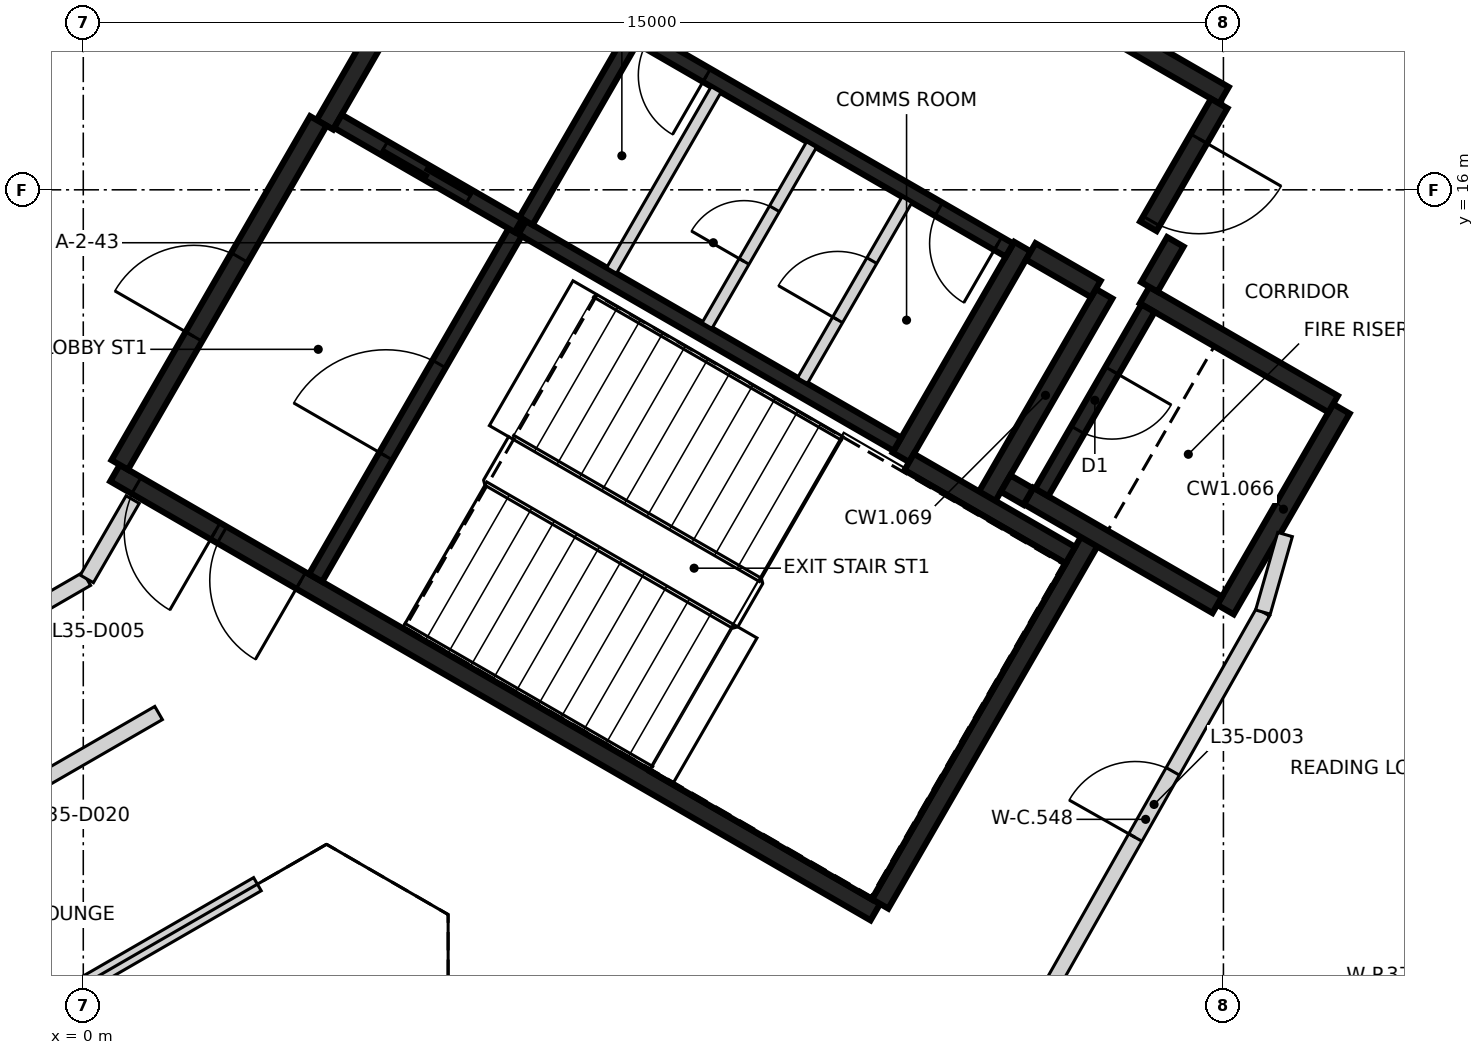
"""IFC4 building model, lengths in metres.
Left out: names, types, materials, properties, quantities, classifications, styles, units other than length and angle.
Written with IfcOpenShell. Run it as: python <this file> out.ifc"""

import sys

from ifc_helpers import new_model, si_unit, direction, frame, frame_2d, origin, place, context, subcontext, project, spatial, rectangle, extrude, element, fill, save


model = new_model("IFC4")
c1 = context("Model", 3, precision=1e-05, world=origin(), true_north=direction((0.0, 1.0)))
c2 = subcontext(c1, "Body", "Model", "MODEL_VIEW")
j1 = project(units=[si_unit("LENGTHUNIT", "METRE"), si_unit("PLANEANGLEUNIT", "RADIAN")], contexts=[c1])
p1 = place(None, origin())
s1 = spatial("IfcSite", under=j1, at=p1, CompositionType="ELEMENT")
p2 = place(p1, origin())
s2 = spatial("IfcBuilding", under=s1, at=p2, CompositionType="ELEMENT")
p3 = place(p2, frame((0.0, 0.0, 143.2)))
s3 = spatial("IfcBuildingStorey", under=s2, at=p3, CompositionType="ELEMENT", Elevation=143.2)
p4 = place(p3, frame((10.42, 6.498, 0.0), z_axis=(0.0, 0.0, 1.0), x_axis=(-0.866021906294, 0.500006057782, 0.0)))
e1 = element("IfcWall", 1, at=p4, inside=s3, PredefinedType="SHEAR", context=c2, shape_type="SweptSolid", body=[
    extrude(rectangle(XDim=11.55, YDim=0.25, at=frame_2d((5.775, 0.0))), origin(), (0.0, 0.0, 1.0), 3.2),
])
p5 = place(p4, frame((10.025, 0.0, 0.0)))
e2 = element("IfcOpeningElement", 2, at=p5, cuts=e1, PredefinedType="OPENING", context=c2, shape_type="SweptSolid", body=[
    extrude(rectangle(XDim=1.2, YDim=2.1, at=frame_2d((0.6, 1.05))), frame((0.0, 0.135, 0.0), z_axis=(0.0, -1.0, 0.0), x_axis=(1.0, 0.0, 0.0)), (0.0, 0.0, 1.0), 0.27),
])
p6 = place(p4, frame((8.725, 0.0, 0.0)))
e3 = element("IfcOpeningElement", 3, at=p6, cuts=e1, PredefinedType="OPENING", context=c2, shape_type="SweptSolid", body=[
    extrude(rectangle(XDim=1.2, YDim=2.1, at=frame_2d((0.6, 1.05))), frame((0.0, 0.135, 0.0), z_axis=(0.0, -1.0, 0.0), x_axis=(1.0, 0.0, 0.0)), (0.0, 0.0, 1.0), 0.27),
])
p7 = place(p3, frame((3.179, 16.856, 0.0), z_axis=(0.0, 0.0, 1.0), x_axis=(0.500004234368, 0.866022959057, 0.0)))
e4 = element("IfcWall", 4, at=p7, inside=s3, PredefinedType="SHEAR", context=c2, shape_type="SweptSolid", body=[
    extrude(rectangle(XDim=6.25, YDim=0.25, at=frame_2d((3.125, 0.0))), origin(), (0.0, 0.0, 1.0), 3.2),
])
p8 = place(p3, frame((0.48, 12.381, 0.0), z_axis=(0.0, 0.0, 1.0), x_axis=(0.49999885962, 0.866026062182, 0.0)))
e5 = element("IfcWall", 5, at=p8, inside=s3, PredefinedType="SHEAR", context=c2, shape_type="SweptSolid", body=[
    extrude(rectangle(XDim=5.225, YDim=0.25, at=frame_2d((2.612, 0.0))), origin(), (0.0, 0.0, 1.0), 3.2),
])
p9 = place(p8, frame((1.95, 0.0, 0.0)))
e6 = element("IfcOpeningElement", 6, at=p9, cuts=e5, PredefinedType="OPENING", context=c2, shape_type="SweptSolid", body=[
    extrude(rectangle(XDim=1.2, YDim=2.1, at=frame_2d((0.6, 1.05))), frame((0.0, 0.135, 0.0), z_axis=(0.0, -1.0, 0.0), x_axis=(1.0, 0.0, 0.0)), (0.0, 0.0, 1.0), 0.27),
])
p10 = place(p3, frame((13.238, 11.378, 0.0), z_axis=(0.0, 0.0, 1.0), x_axis=(-0.500008851346, -0.866020293397, 0.0)))
e7 = element("IfcWall", 7, at=p10, inside=s3, PredefinedType="SHEAR", context=c2, shape_type="SweptSolid", body=[
    extrude(rectangle(XDim=5.51, YDim=0.25, at=frame_2d((2.755, 0.0))), origin(), (0.0, 0.0, 1.0), 3.2),
])
p11 = place(p3, frame((12.357, 15.252, 0.0), z_axis=(0.0, 0.0, 1.0), x_axis=(-0.500028443584, -0.866008981251, 0.0)))
e8 = element("IfcWall", 8, at=p11, inside=s3, PredefinedType="SHEAR", context=c2, shape_type="SweptSolid", body=[
    extrude(rectangle(XDim=3.2, YDim=0.25, at=frame_2d((1.6, 0.0))), origin(), (0.0, 0.0, 1.0), 3.2),
])
p12 = place(p3, frame((16.552, 13.119, 0.0), z_axis=(0.0, 0.0, 1.0), x_axis=(-0.499978833458, -0.866037623948, 0.0)))
e9 = element("IfcWall", 9, at=p12, inside=s3, PredefinedType="SHEAR", context=c2, shape_type="SweptSolid", body=[
    extrude(rectangle(XDim=3.05, YDim=0.25, at=frame_2d((1.525, 0.0))), origin(), (0.0, 0.0, 1.0), 3.2),
])
p13 = place(p3, frame((14.918, 10.54, 0.0), z_axis=(0.0, 0.0, 1.0), x_axis=(-0.866063538972, 0.499933942099, 0.0)))
e10 = element("IfcWall", 10, at=p13, inside=s3, PredefinedType="SHEAR", context=c2, shape_type="SweptSolid", body=[
    extrude(rectangle(XDim=2.865, YDim=0.25, at=frame_2d((1.432, 0.0))), origin(), (0.0, 0.0, 1.0), 3.2),
])
p14 = place(p3, frame((13.963, 14.614, 0.0), z_axis=(0.0, 0.0, 1.0), x_axis=(0.866042235819, -0.499970844928, 0.0)))
e11 = element("IfcWall", 11, at=p14, inside=s3, PredefinedType="SHEAR", context=c2, shape_type="SweptSolid", body=[
    extrude(rectangle(XDim=2.865, YDim=0.25, at=frame_2d((1.432, 0.0))), origin(), (0.0, 0.0, 1.0), 3.2),
])
p15 = place(p3, frame((11.888, 11.961, 0.0), z_axis=(0.0, 0.0, 1.0), x_axis=(0.500003324108, 0.866023484601, 0.0)))
e12 = element("IfcWall", 12, at=p15, inside=s3, PredefinedType="SHEAR", context=c2, shape_type="SweptSolid", body=[
    extrude(rectangle(XDim=3.085, YDim=0.25, at=frame_2d((1.542, 0.0))), origin(), (0.0, 0.0, 1.0), 3.2),
])
p16 = place(p3, frame((10.865, 12.418, 0.0), z_axis=(0.0, 0.0, 1.0), x_axis=(0.866026229868, -0.499998569178, 0.0)))
e13 = element("IfcWall", 13, at=p16, inside=s3, PredefinedType="SHEAR", context=c2, shape_type="SweptSolid", body=[
    extrude(rectangle(XDim=2.449, YDim=0.25, at=frame_2d((1.225, 0.0))), origin(), (0.0, 0.0, 1.0), 3.2),
])
p17 = place(p3, frame((13.297, 18.231, 0.0), z_axis=(0.0, 0.0, 1.0), x_axis=(0.866043531843, -0.499968599967, 0.0)))
e14 = element("IfcWall", 14, at=p17, inside=s3, PredefinedType="SHEAR", context=c2, shape_type="SweptSolid", body=[
    extrude(rectangle(XDim=1.975, YDim=0.25, at=frame_2d((0.987, 0.0))), origin(), (0.0, 0.0, 1.0), 3.2),
])
p18 = place(p3, frame((14.945, 17.135, 0.0), z_axis=(0.0, 0.0, 1.0), x_axis=(-0.499983108224, -0.866035156036, 0.0)))
e15 = element("IfcWall", 15, at=p18, inside=s3, PredefinedType="SHEAR", context=c2, shape_type="SweptSolid", body=[
    extrude(rectangle(XDim=1.865, YDim=0.25, at=frame_2d((0.932, 0.0))), origin(), (0.0, 0.0, 1.0), 3.2),
])
p19 = place(p18, frame((0.535, 0.0, 0.0)))
e16 = element("IfcOpeningElement", 16, at=p19, cuts=e15, PredefinedType="OPENING", context=c2, shape_type="SweptSolid", body=[
    extrude(rectangle(XDim=1.25, YDim=2.1, at=frame_2d((0.625, 1.05))), frame((0.0, 0.135, 0.0), z_axis=(0.0, -1.0, 0.0), x_axis=(1.0, 0.0, 0.0)), (0.0, 0.0, 1.0), 0.27),
])
p20 = place(p3, frame((13.322, 14.695, 0.0), z_axis=(0.0, 0.0, 1.0), x_axis=(-0.866017078145, 0.500014420154, 0.0)))
e17 = element("IfcWall", 17, at=p20, inside=s3, PredefinedType="SHEAR", context=c2, shape_type="SweptSolid", body=[
    extrude(rectangle(XDim=0.989, YDim=0.25, at=frame_2d((0.495, 0.0))), origin(), (0.0, 0.0, 1.0), 3.2),
])
p21 = place(p3, frame((14.368, 15.315, 0.0), z_axis=(0.0, 0.0, 1.0), x_axis=(-0.499897359611, -0.866084655132, 0.0)))
e18 = element("IfcWall", 18, at=p21, inside=s3, PredefinedType="SHEAR", context=c2, shape_type="SweptSolid", body=[
    extrude(rectangle(XDim=0.685, YDim=0.25, at=frame_2d((0.342, 0.0))), origin(), (0.0, 0.0, 1.0), 3.2),
])
p22 = place(p3, frame((12.433, 11.964, 0.0), z_axis=(0.0, 0.0, 1.0), x_axis=(-0.866055875208, 0.499947218231, 0.0)))
e19 = element("IfcWall", 19, at=p22, inside=s3, PredefinedType="SHEAR", context=c2, shape_type="SweptSolid", body=[
    extrude(rectangle(XDim=0.345, YDim=0.25, at=frame_2d((0.172, 0.0))), origin(), (0.0, 0.0, 1.0), 3.2),
])
p23 = place(p3, frame((5.775, 15.502, 0.0), z_axis=(0.0, 0.0, 1.0), x_axis=(0.866020080793, -0.500009219579, 0.0)))
e20 = element("IfcWall", 20, at=p23, inside=s3, PredefinedType="SHEAR", context=c2, shape_type="SweptSolid", body=[
    extrude(rectangle(XDim=5.699, YDim=0.2, at=frame_2d((2.85, 0.0))), origin(), (0.0, 0.0, 1.0), 3.2),
])
p24 = place(p3, frame((12.185, 15.207, 0.0), z_axis=(0.0, 0.0, 1.0), x_axis=(-0.866020080793, 0.500009219579, 0.0)))
e21 = element("IfcWall", 21, at=p24, inside=s3, PredefinedType="SHEAR", context=c2, shape_type="SweptSolid", body=[
    extrude(rectangle(XDim=5.699, YDim=0.2, at=frame_2d((2.85, 0.0))), origin(), (0.0, 0.0, 1.0), 3.2),
])
p25 = place(p24, frame((0.174, 0.0, 0.0)))
e22 = element("IfcOpeningElement", 22, at=p25, cuts=e21, PredefinedType="OPENING", context=c2, shape_type="SweptSolid", body=[
    extrude(rectangle(XDim=0.9, YDim=2.1, at=frame_2d((0.45, 1.05))), frame((0.0, 0.11, 0.0), z_axis=(0.0, -1.0, 0.0), x_axis=(1.0, 0.0, 0.0)), (0.0, 0.0, 1.0), 0.22),
])
p26 = place(p24, frame((4.599, 0.0, 0.0)))
e23 = element("IfcOpeningElement", 23, at=p26, cuts=e21, PredefinedType="OPENING", context=c2, shape_type="SweptSolid", body=[
    extrude(rectangle(XDim=0.9, YDim=2.1, at=frame_2d((0.45, 1.05))), frame((0.0, 0.11, 0.0), z_axis=(0.0, -1.0, 0.0), x_axis=(1.0, 0.0, 0.0)), (0.0, 0.0, 1.0), 0.22),
])
p27 = place(p3, frame((3.057, 10.895, 0.0), z_axis=(0.0, 0.0, 1.0), x_axis=(0.499989418164, 0.866031513124, 0.0)))
e24 = element("IfcWall", 24, at=p27, inside=s3, PredefinedType="SHEAR", context=c2, shape_type="SweptSolid", body=[
    extrude(rectangle(XDim=5.251, YDim=0.2, at=frame_2d((2.625, 0.0))), origin(), (0.0, 0.0, 1.0), 3.2),
])
p28 = place(p27, frame((1.849, 0.0, 0.0)))
e25 = element("IfcOpeningElement", 25, at=p28, cuts=e24, PredefinedType="OPENING", context=c2, shape_type="SweptSolid", body=[
    extrude(rectangle(XDim=1.4, YDim=2.1, at=frame_2d((0.7, 1.05))), frame((0.0, 0.11, 0.0), z_axis=(0.0, -1.0, 0.0), x_axis=(1.0, 0.0, 0.0)), (0.0, 0.0, 1.0), 0.22),
])
p29 = place(p3, frame((14.008, 14.442, 0.0), z_axis=(0.0, 0.0, 1.0), x_axis=(-0.499986818241, -0.866033014143, 0.0)))
e26 = element("IfcWall", 26, at=p29, inside=s3, PredefinedType="SHEAR", context=c2, shape_type="SweptSolid", body=[
    extrude(rectangle(XDim=2.798, YDim=0.2, at=frame_2d((1.399, 0.0))), origin(), (0.0, 0.0, 1.0), 3.2),
])
p30 = place(p29, frame((0.949, 0.0, 0.0)))
e27 = element("IfcOpeningElement", 27, at=p30, cuts=e26, PredefinedType="OPENING", context=c2, shape_type="SweptSolid", body=[
    extrude(rectangle(XDim=0.9, YDim=2.1, at=frame_2d((0.45, 1.05))), frame((0.0, 0.11, 0.0), z_axis=(0.0, -1.0, 0.0), x_axis=(1.0, 0.0, 0.0)), (0.0, 0.0, 1.0), 0.22),
])
p31 = place(p3, frame((7.199, 17.97, 0.0), z_axis=(0.0, 0.0, 1.0), x_axis=(-0.499968400327, -0.866043647095, 0.0)))
e28 = element("IfcWall", 28, at=p31, inside=s3, PredefinedType="SHEAR", context=c2, shape_type="SweptSolid", body=[
    extrude(rectangle(XDim=2.75, YDim=0.2, at=frame_2d((1.375, 0.0))), origin(), (0.0, 0.0, 1.0), 3.2),
])
p32 = place(p3, frame((5.725, 15.531, 0.0), z_axis=(0.0, 0.0, 1.0), x_axis=(-0.866037306777, 0.499979382845, 0.0)))
e29 = element("IfcWall", 29, at=p32, inside=s3, PredefinedType="SHEAR", context=c2, shape_type="SweptSolid", body=[
    extrude(rectangle(XDim=2.742, YDim=0.2, at=frame_2d((1.371, 0.0))), origin(), (0.0, 0.0, 1.0), 3.2),
])
p33 = place(p32, frame((0.743, 0.0, 0.0)))
e30 = element("IfcOpeningElement", 30, at=p33, cuts=e29, PredefinedType="OPENING", context=c2, shape_type="SweptSolid", body=[
    extrude(rectangle(XDim=1.3, YDim=2.1, at=frame_2d((0.65, 1.05))), frame((0.0, 0.11, 0.0), z_axis=(0.0, -1.0, 0.0), x_axis=(1.0, 0.0, 0.0)), (0.0, 0.0, 1.0), 0.22),
])
p34 = place(p3, frame((9.462, 13.489, 0.0), z_axis=(0.0, 0.0, 1.0), x_axis=(0.50002746344, 0.86600954718, 0.0)))
e31 = element("IfcWall", 31, at=p34, inside=s3, PredefinedType="PARTITIONING", context=c2, shape_type="SweptSolid", body=[
    extrude(rectangle(XDim=2.748, YDim=0.15, at=frame_2d((1.374, 0.0))), origin(), (0.0, 0.0, 1.0), 3.2),
])
p35 = place(p34, frame((0.924, 0.0, 0.0)))
e32 = element("IfcOpeningElement", 32, at=p35, cuts=e31, PredefinedType="OPENING", context=c2, shape_type="SweptSolid", body=[
    extrude(rectangle(XDim=0.9, YDim=2.1, at=frame_2d((0.45, 1.05))), frame((0.0, 0.085, 0.0), z_axis=(0.0, -1.0, 0.0), x_axis=(1.0, 0.0, 0.0)), (0.0, 0.0, 1.0), 0.17),
])
p36 = place(p3, frame((8.207, 14.214, 0.0), z_axis=(0.0, 0.0, 1.0), x_axis=(0.499922376475, 0.866070215109, 0.0)))
e33 = element("IfcWall", 33, at=p36, inside=s3, PredefinedType="PARTITIONING", context=c2, shape_type="SweptSolid", body=[
    extrude(rectangle(XDim=2.749, YDim=0.15, at=frame_2d((1.374, 0.0))), origin(), (0.0, 0.0, 1.0), 3.2),
])
p37 = place(p36, frame((0.974, 0.0, 0.0)))
e34 = element("IfcOpeningElement", 34, at=p37, cuts=e33, PredefinedType="OPENING", context=c2, shape_type="SweptSolid", body=[
    extrude(rectangle(XDim=0.8, YDim=2.1, at=frame_2d((0.4, 1.05))), frame((0.0, 0.085, 0.0), z_axis=(0.0, -1.0, 0.0), x_axis=(1.0, 0.0, 0.0)), (0.0, 0.0, 1.0), 0.17),
])
p38 = place(p3, frame((6.951, 14.939, 0.0), z_axis=(0.0, 0.0, 1.0), x_axis=(0.50002746344, 0.86600954718, 0.0)))
e35 = element("IfcWall", 35, at=p38, inside=s3, PredefinedType="PARTITIONING", context=c2, shape_type="SweptSolid", body=[
    extrude(rectangle(XDim=2.748, YDim=0.15, at=frame_2d((1.374, 0.0))), origin(), (0.0, 0.0, 1.0), 3.2),
])
p39 = place(p3, frame((-8.382, 3.705, 0.0), z_axis=(0.0, 0.0, 1.0), x_axis=(0.866012036978, 0.500023151273, 0.0)))
e36 = element("IfcWall", 36, at=p39, inside=s3, PredefinedType="PARTITIONING", context=c2, shape_type="SweptSolid", body=[
    extrude(rectangle(XDim=10.823, YDim=0.2, at=frame_2d((5.412, 0.0))), origin(), (0.0, 0.0, 1.0), 3.2),
])
p40 = place(p39, frame((7.661, 0.0, 0.0)))
e37 = element("IfcOpeningElement", 37, at=p40, cuts=e36, PredefinedType="OPENING", context=c2, shape_type="SweptSolid", body=[
    extrude(rectangle(XDim=0.9, YDim=2.1, at=frame_2d((0.45, 1.05))), frame((0.0, 0.11, 0.0), z_axis=(0.0, -1.0, 0.0), x_axis=(1.0, 0.0, 0.0)), (0.0, 0.0, 1.0), 0.22),
])
p41 = place(p39, frame((2.261, 0.0, 0.0)))
e38 = element("IfcOpeningElement", 38, at=p41, cuts=e36, PredefinedType="OPENING", context=c2, shape_type="SweptSolid", body=[
    extrude(rectangle(XDim=0.9, YDim=2.1, at=frame_2d((0.45, 1.05))), frame((0.0, 0.11, 0.0), z_axis=(0.0, -1.0, 0.0), x_axis=(1.0, 0.0, 0.0)), (0.0, 0.0, 1.0), 0.22),
])
p42 = place(p3, frame((-8.161, 6.142, 0.0), z_axis=(0.0, 0.0, 1.0), x_axis=(0.865927304867, 0.500169873828, 0.0)))
e39 = element("IfcWall", 39, at=p42, inside=s3, PredefinedType="PARTITIONING", context=c2, shape_type="SweptSolid", body=[
    extrude(rectangle(XDim=9.478, YDim=0.2, at=frame_2d((4.739, 0.0))), origin(), (0.0, 0.0, 1.0), 3.2),
])
p43 = place(p42, frame((4.851, 0.0, 0.0)))
e40 = element("IfcOpeningElement", 40, at=p43, cuts=e39, PredefinedType="OPENING", context=c2, shape_type="SweptSolid", body=[
    extrude(rectangle(XDim=1.0, YDim=2.1, at=frame_2d((0.5, 1.05))), frame((0.0, 0.11, 0.0), z_axis=(0.0, -1.0, 0.0), x_axis=(1.0, 0.0, 0.0)), (0.0, 0.0, 1.0), 0.22),
])
p44 = place(p42, frame((7.583, 0.0, 0.0)))
e41 = element("IfcOpeningElement", 41, at=p44, cuts=e39, PredefinedType="OPENING", context=c2, shape_type="SweptSolid", body=[
    extrude(rectangle(XDim=1.0, YDim=2.1, at=frame_2d((0.5, 1.05))), frame((0.0, 0.11, 0.0), z_axis=(0.0, -1.0, 0.0), x_axis=(1.0, 0.0, 0.0)), (0.0, 0.0, 1.0), 0.22),
])
p45 = place(p3, frame((0.047, 10.881, 0.0), z_axis=(0.0, 0.0, 1.0), x_axis=(0.500038011057, 0.866003456978, 0.0)))
e42 = element("IfcWall", 42, at=p45, inside=s3, PredefinedType="PARTITIONING", context=c2, shape_type="SweptSolid", body=[
    extrude(rectangle(XDim=1.206, YDim=0.2, at=frame_2d((0.603, 0.0))), origin(), (0.0, 0.0, 1.0), 3.2),
])
p46 = place(p3, frame((12.433, 4.992, 0.0), z_axis=(0.0, 0.0, 1.0), x_axis=(0.492740203499, 0.870176471675, 0.0)))
e43 = element("IfcWall", 43, at=p46, inside=s3, PredefinedType="PARTITIONING", context=c2, shape_type="SweptSolid", body=[
    extrude(rectangle(XDim=6.265, YDim=0.2, at=frame_2d((3.133, 0.0))), origin(), (0.0, 0.0, 1.0), 3.2),
])
p47 = place(p46, frame((2.858, 0.0, 0.0)))
e44 = element("IfcOpeningElement", 44, at=p47, cuts=e43, PredefinedType="OPENING", context=c2, shape_type="SweptSolid", body=[
    extrude(rectangle(XDim=1.0, YDim=2.1, at=frame_2d((0.5, 1.05))), frame((0.0, 0.11, 0.0), z_axis=(0.0, -1.0, 0.0), x_axis=(1.0, 0.0, 0.0)), (0.0, 0.0, 1.0), 0.22),
])
p48 = place(p3, frame((15.52, 10.445, 0.0), z_axis=(0.0, 0.0, 1.0), x_axis=(0.274143458758, 0.961688808306, 0.0)))
e45 = element("IfcWall", 45, at=p48, inside=s3, PredefinedType="PARTITIONING", context=c2, shape_type="SweptSolid", body=[
    extrude(rectangle(XDim=1.061, YDim=0.2, at=frame_2d((0.53, 0.0))), origin(), (0.0, 0.0, 1.0), 3.2),
])
p49 = place(p3, frame((-7.082, 1.453, 0.0), z_axis=(0.0, 0.0, 1.0), x_axis=(0.866010525116, 0.500025769724, 0.0)))
e46 = element("IfcWall", 46, at=p49, inside=s3, PredefinedType="PARTITIONING", context=c2, shape_type="SweptSolid", body=[
    extrude(rectangle(XDim=10.823, YDim=0.2, at=frame_2d((5.411, 0.0))), origin(), (0.0, 0.0, 1.0), 2.3),
])
p50 = place(p33, origin())
e47 = element("IfcDoor", 47, at=p50, inside=s3, OperationType="SLIDING_TO_LEFT", PredefinedType="DOOR", context=c2, shape_type="SweptSolid", body=[
    extrude(rectangle(XDim=1.3, YDim=2.1, at=frame_2d((0.65, 1.05))), frame((0.0, 0.025, 0.0), z_axis=(0.0, -1.0, 0.0), x_axis=(1.0, 0.0, 0.0)), (0.0, 0.0, 1.0), 0.05),
])
fill(e30, e47)
p51 = place(p19, origin())
e48 = element("IfcDoor", 48, at=p51, inside=s3, OperationType="SINGLE_SWING_LEFT", PredefinedType="DOOR", context=c2, shape_type="SweptSolid", body=[
    extrude(rectangle(XDim=1.25, YDim=2.1, at=frame_2d((0.625, 1.05))), frame((0.0, 0.025, 0.0), z_axis=(0.0, -1.0, 0.0), x_axis=(1.0, 0.0, 0.0)), (0.0, 0.0, 1.0), 0.05),
])
fill(e16, e48)
p52 = place(p5, origin())
e49 = element("IfcDoor", 49, at=p52, inside=s3, OperationType="SINGLE_SWING_LEFT", PredefinedType="DOOR", context=c2, shape_type="SweptSolid", body=[
    extrude(rectangle(XDim=1.2, YDim=2.1, at=frame_2d((0.6, 1.05))), frame((0.0, 0.025, 0.0), z_axis=(0.0, -1.0, 0.0), x_axis=(1.0, 0.0, 0.0)), (0.0, 0.0, 1.0), 0.05),
])
fill(e2, e49)
p53 = place(p6, origin())
e50 = element("IfcDoor", 50, at=p53, inside=s3, OperationType="SINGLE_SWING_RIGHT", PredefinedType="DOOR", context=c2, shape_type="SweptSolid", body=[
    extrude(rectangle(XDim=1.2, YDim=2.1, at=frame_2d((0.6, 1.05))), frame((0.0, 0.025, 0.0), z_axis=(0.0, -1.0, 0.0), x_axis=(1.0, 0.0, 0.0)), (0.0, 0.0, 1.0), 0.05),
])
fill(e3, e50)
p54 = place(p28, origin())
e51 = element("IfcDoor", 51, at=p54, inside=s3, OperationType="SINGLE_SWING_LEFT", PredefinedType="DOOR", context=c2, shape_type="SweptSolid", body=[
    extrude(rectangle(XDim=1.4, YDim=2.1, at=frame_2d((0.7, 1.05))), frame((0.0, 0.025, 0.0), z_axis=(0.0, -1.0, 0.0), x_axis=(1.0, 0.0, 0.0)), (0.0, 0.0, 1.0), 0.05),
])
fill(e25, e51)
p55 = place(p25, origin())
e52 = element("IfcDoor", 52, at=p55, inside=s3, OperationType="SINGLE_SWING_RIGHT", PredefinedType="DOOR", context=c2, shape_type="SweptSolid", body=[
    extrude(rectangle(XDim=0.9, YDim=2.1, at=frame_2d((0.45, 1.05))), frame((0.0, 0.025, 0.0), z_axis=(0.0, -1.0, 0.0), x_axis=(1.0, 0.0, 0.0)), (0.0, 0.0, 1.0), 0.05),
])
fill(e22, e52)
p56 = place(p35, origin())
e53 = element("IfcDoor", 53, at=p56, inside=s3, OperationType="SINGLE_SWING_LEFT", PredefinedType="DOOR", context=c2, shape_type="SweptSolid", body=[
    extrude(rectangle(XDim=0.9, YDim=2.1, at=frame_2d((0.45, 1.05))), frame((0.0, 0.025, 0.0), z_axis=(0.0, -1.0, 0.0), x_axis=(1.0, 0.0, 0.0)), (0.0, 0.0, 1.0), 0.05),
])
fill(e32, e53)
p57 = place(p37, origin())
e54 = element("IfcDoor", 54, at=p57, inside=s3, OperationType="SINGLE_SWING_RIGHT", PredefinedType="DOOR", context=c2, shape_type="SweptSolid", body=[
    extrude(rectangle(XDim=0.8, YDim=2.1, at=frame_2d((0.4, 1.05))), frame((0.0, 0.025, 0.0), z_axis=(0.0, -1.0, 0.0), x_axis=(1.0, 0.0, 0.0)), (0.0, 0.0, 1.0), 0.05),
])
fill(e34, e54)
p58 = place(p26, origin())
e55 = element("IfcDoor", 55, at=p58, inside=s3, OperationType="SINGLE_SWING_LEFT", PredefinedType="DOOR", context=c2, shape_type="SweptSolid", body=[
    extrude(rectangle(XDim=0.9, YDim=2.1, at=frame_2d((0.45, 1.05))), frame((0.0, 0.025, 0.0), z_axis=(0.0, -1.0, 0.0), x_axis=(1.0, 0.0, 0.0)), (0.0, 0.0, 1.0), 0.05),
])
fill(e23, e55)
p59 = place(p30, origin())
e56 = element("IfcDoor", 56, at=p59, inside=s3, OperationType="SINGLE_SWING_RIGHT", PredefinedType="DOOR", context=c2, shape_type="SweptSolid", body=[
    extrude(rectangle(XDim=0.9, YDim=2.1, at=frame_2d((0.45, 1.05))), frame((0.0, 0.025, 0.0), z_axis=(0.0, -1.0, 0.0), x_axis=(1.0, 0.0, 0.0)), (0.0, 0.0, 1.0), 0.05),
])
fill(e27, e56)
p60 = place(p9, origin())
e57 = element("IfcDoor", 57, at=p60, inside=s3, OperationType="SINGLE_SWING_RIGHT", PredefinedType="DOOR", context=c2, shape_type="SweptSolid", body=[
    extrude(rectangle(XDim=1.2, YDim=2.1, at=frame_2d((0.6, 1.05))), frame((0.0, 0.025, 0.0), z_axis=(0.0, -1.0, 0.0), x_axis=(1.0, 0.0, 0.0)), (0.0, 0.0, 1.0), 0.05),
])
fill(e6, e57)
p61 = place(p47, frame((1.0, 0.0, 0.0), z_axis=(0.0, 0.0, 1.0), x_axis=(-1.0, 0.0, 0.0)))
e58 = element("IfcDoor", 58, at=p61, inside=s3, OperationType="SINGLE_SWING_LEFT", PredefinedType="DOOR", context=c2, shape_type="SweptSolid", body=[
    extrude(rectangle(XDim=1.0, YDim=2.1, at=frame_2d((0.5, 1.05))), frame((0.0, 0.025, 0.0), z_axis=(0.0, -1.0, 0.0), x_axis=(1.0, 0.0, 0.0)), (0.0, 0.0, 1.0), 0.05),
])
fill(e44, e58)
save(model, sys.argv[1])
